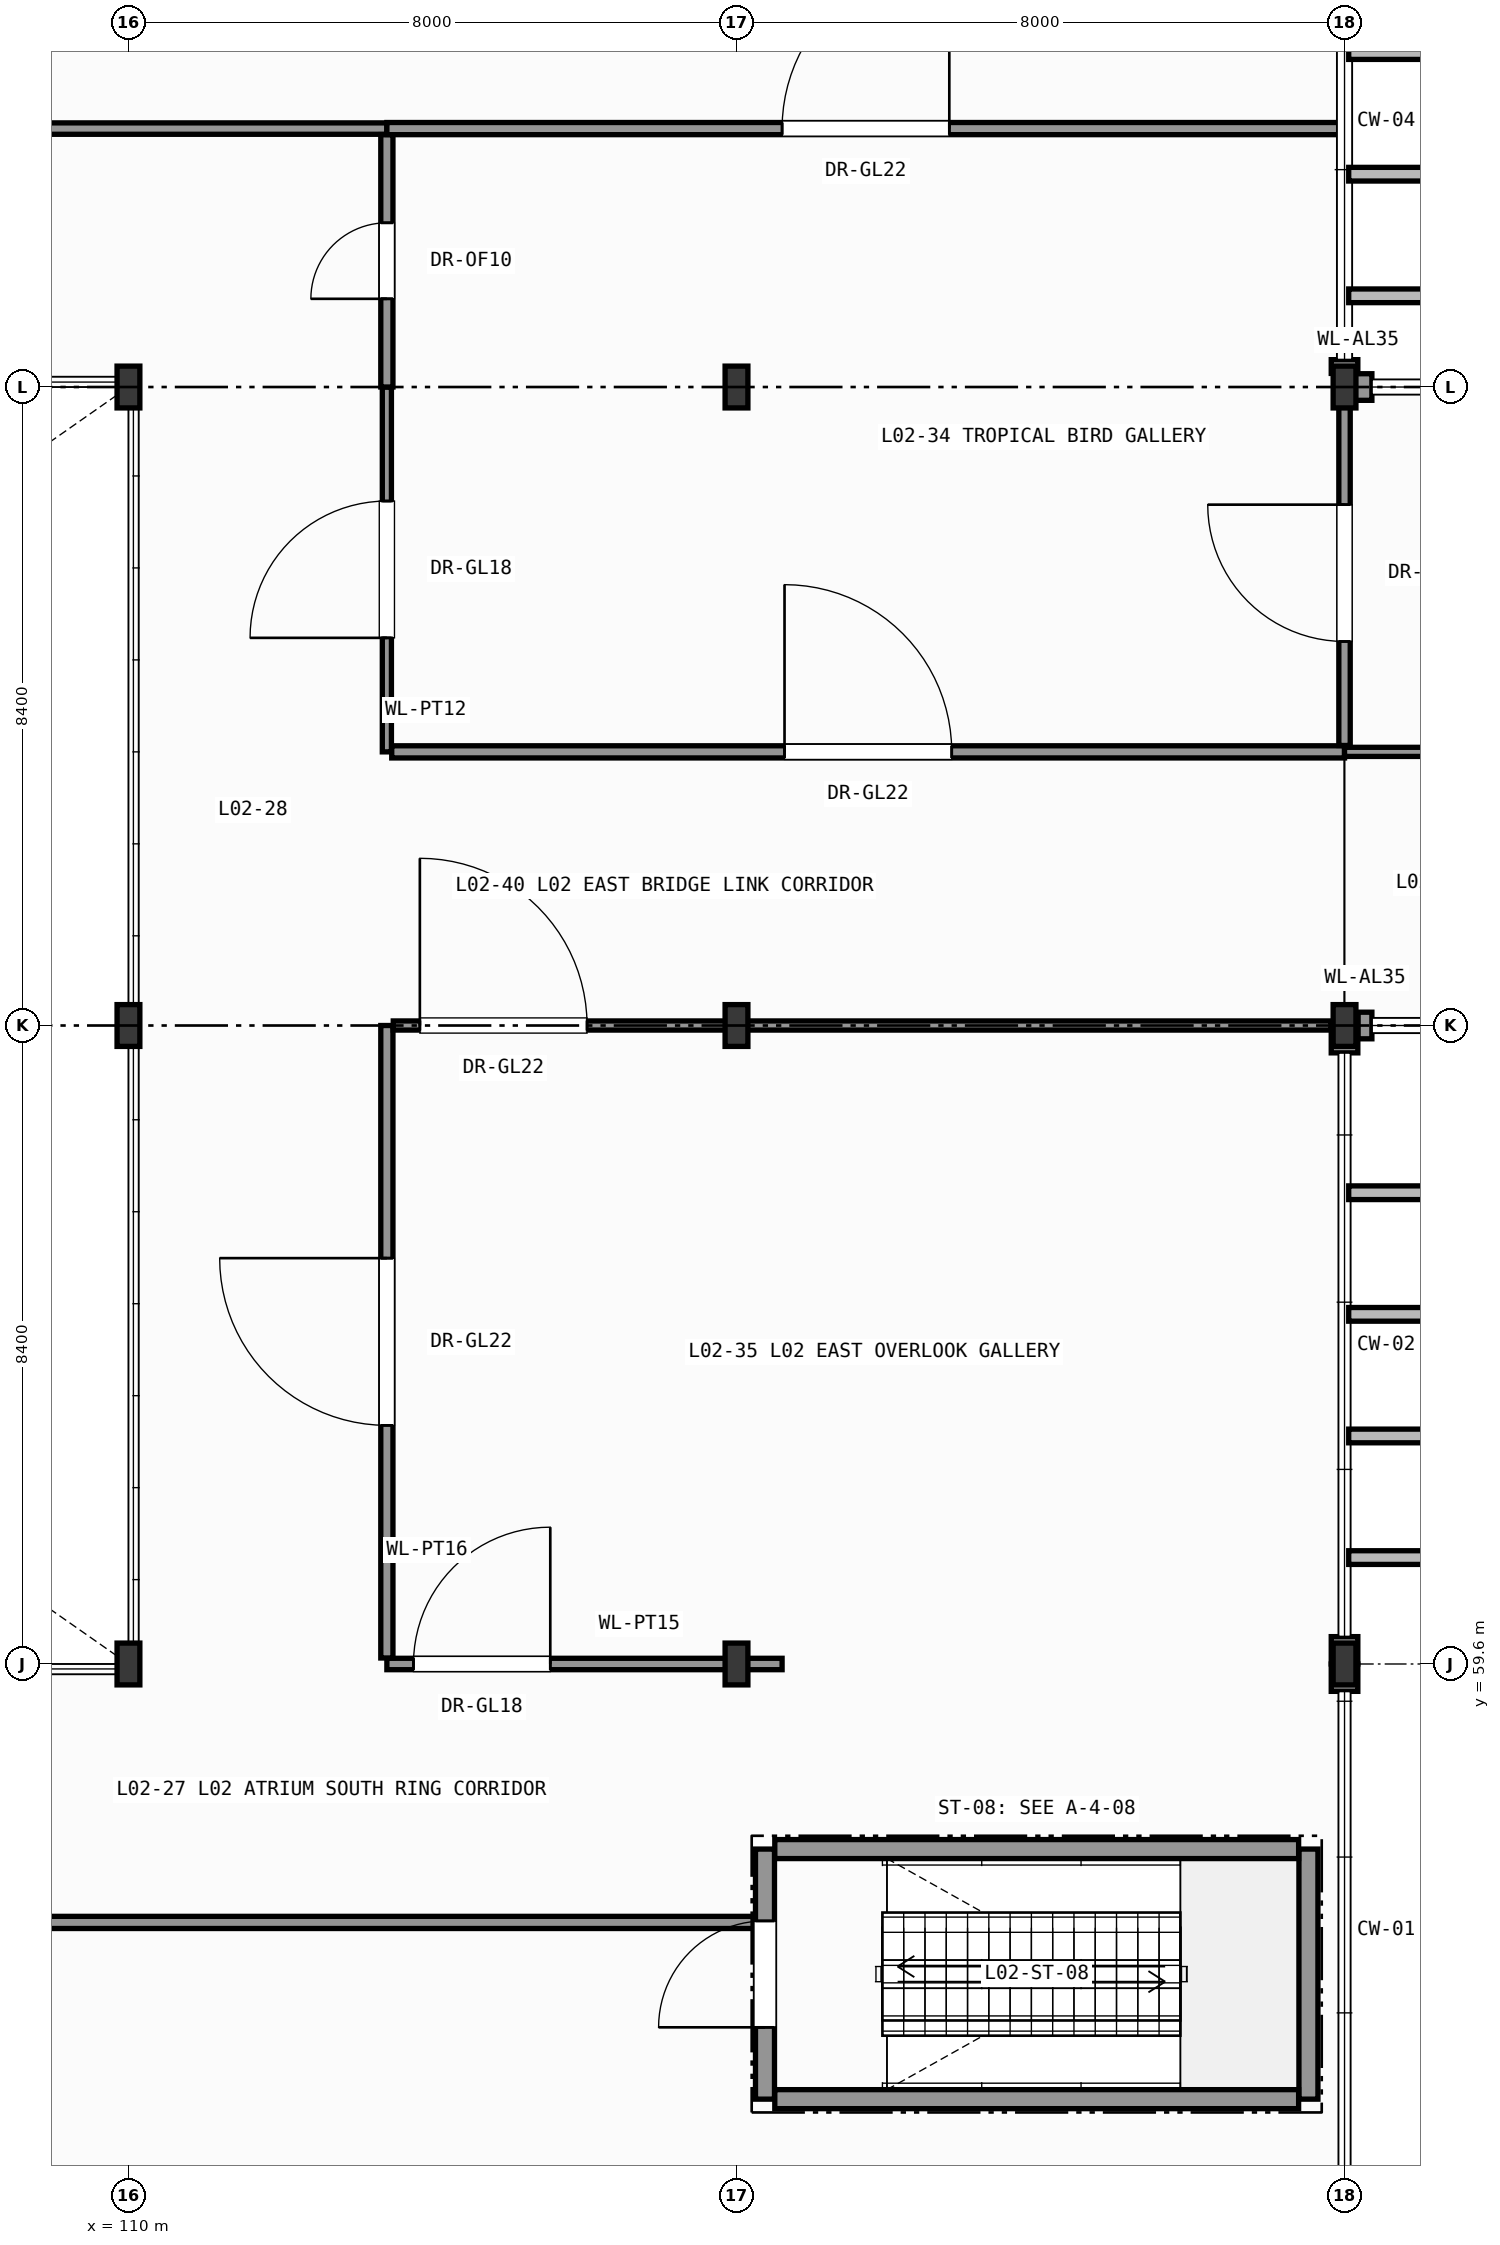
"""IFC4 building model, lengths in metres.
Left out: names, types, materials, properties, quantities, classifications, styles, units other than length and angle.
Written with IfcOpenShell. Run it as: python <this file> out.ifc"""

import sys

from ifc_helpers import new_model, si_unit, direction, frame, frame_2d, origin, origin_2d, place, context, subcontext, project, spatial, rectangle, i_section, extrude, element, fill, save


model = new_model("IFC4")
c1 = context("Model", 3, precision=1e-05, world=origin(), true_north=direction((0.0, 1.0)))
c2 = subcontext(c1, "Body", "Model", "MODEL_VIEW")
j1 = project(units=[si_unit("LENGTHUNIT", "METRE"), si_unit("PLANEANGLEUNIT", "RADIAN")], contexts=[c1])
p1 = place(None, origin())
s1 = spatial("IfcSite", under=j1, at=p1, CompositionType="ELEMENT")
p2 = place(p1, origin())
s2 = spatial("IfcBuilding", under=s1, at=p2, CompositionType="ELEMENT")
p3 = place(p2, frame((0.0, 0.0, 7.8)))
s3 = spatial("IfcBuildingStorey", under=s2, at=p3, CompositionType="ELEMENT", Elevation=7.8)
for number, where, z_axis, x_axis in (
    (1, (110.0, 59.6, 0.0), (0.0, 0.0, 1.0), (1.0, 0.0, 0.0)),
    (2, (110.0, 68.0, 0.0), (0.0, 0.0, 1.0), (1.0, 0.0, 0.0)),
    (3, (110.0, 76.4, 0.0), (0.0, 0.0, 1.0), (1.0, 0.0, 0.0)),
    (4, (118.0, 59.6, 0.0), (0.0, 0.0, 1.0), (1.0, 0.0, 0.0)),
    (5, (118.0, 68.0, 0.0), (0.0, 0.0, 1.0), (1.0, 0.0, 0.0)),
    (6, (118.0, 76.4, 0.0), (0.0, 0.0, 1.0), (1.0, 0.0, 0.0)),
    (7, (126.0, 59.6, 0.0), (0.0, 0.0, 1.0), (1.0, 0.0, 0.0)),
    (8, (126.0, 68.0, 0.0), (0.0, 0.0, 1.0), (1.0, 0.0, 0.0)),
    (9, (126.0, 76.4, 0.0), (0.0, 0.0, 1.0), (1.0, 0.0, 0.0)),
):
    element("IfcColumn", number, at=place(p3, frame(where, z_axis=z_axis, x_axis=x_axis)), inside=s3, PredefinedType="COLUMN", context=c2, shape_type="SweptSolid", body=[
        extrude(i_section(OverallWidth=0.3, OverallDepth=0.55, WebThickness=0.015, FlangeThickness=0.029, FilletRadius=0.027, at=origin_2d()), origin(), (0.0, 0.0, 1.0), 5.4),
    ])
p4 = place(p3, frame((126.0, 59.24, 0.0), z_axis=(0.0, 0.0, 1.0), x_axis=(0.0, 1.0, 0.0)))
e10 = element("IfcWall", 10, at=p4, inside=s3, PredefinedType="SOLIDWALL", context=c2, shape_type="SweptSolid", body=[
    extrude(rectangle(XDim=0.36, YDim=0.35, at=frame_2d((0.18, 0.0))), origin(), (0.0, 0.0, 1.0), 4.845),
])
p5 = place(p3, frame((126.0, 59.6, 0.0), z_axis=(0.0, 0.0, 1.0), x_axis=(0.0, 1.0, 0.0)))
e11 = element("IfcWall", 11, at=p5, inside=s3, PredefinedType="SOLIDWALL", context=c2, shape_type="SweptSolid", body=[
    extrude(rectangle(XDim=0.36, YDim=0.35, at=frame_2d((0.18, 0.0))), origin(), (0.0, 0.0, 1.0), 4.695),
])
p6 = place(p3, frame((126.0, 67.64, 0.0), z_axis=(0.0, 0.0, 1.0), x_axis=(0.0, 1.0, 0.0)))
e12 = element("IfcWall", 12, at=p6, inside=s3, PredefinedType="SOLIDWALL", context=c2, shape_type="SweptSolid", body=[
    extrude(rectangle(XDim=0.36, YDim=0.35, at=frame_2d((0.18, 0.0))), origin(), (0.0, 0.0, 1.0), 4.695),
])
p7 = place(p3, frame((126.179, 68.0, 0.0), z_axis=(0.0, 0.0, 1.0), x_axis=(1.0, 0.0, 0.0)))
e13 = element("IfcWall", 13, at=p7, inside=s3, PredefinedType="SOLIDWALL", context=c2, shape_type="SweptSolid", body=[
    extrude(rectangle(XDim=0.181, YDim=0.35, at=frame_2d((0.091, 0.0))), origin(), (0.0, 0.0, 1.0), 5.15),
])
p8 = place(p3, frame((126.36, 76.4, 0.0), z_axis=(0.0, 0.0, 1.0), x_axis=(-1.0, 0.0, 0.0)))
e14 = element("IfcWall", 14, at=p8, inside=s3, PredefinedType="SOLIDWALL", context=c2, shape_type="SweptSolid", body=[
    extrude(rectangle(XDim=0.36, YDim=0.35, at=frame_2d((0.18, 0.0))), origin(), (0.0, 0.0, 1.0), 4.745),
])
p9 = place(p3, frame((126.0, 76.579, 0.0), z_axis=(0.0, 0.0, 1.0), x_axis=(0.0, 1.0, 0.0)))
e15 = element("IfcWall", 15, at=p9, inside=s3, PredefinedType="SOLIDWALL", context=c2, shape_type="SweptSolid", body=[
    extrude(rectangle(XDim=0.181, YDim=0.35, at=frame_2d((0.09, 0.0))), origin(), (0.0, 0.0, 1.0), 5.15),
])
p10 = place(p3, frame((118.375, 53.875, 0.0), z_axis=(0.0, 0.0, 1.0), x_axis=(0.0, 1.0, 0.0)))
e16 = element("IfcWall", 16, at=p10, inside=s3, PredefinedType="SHEAR", context=c2, shape_type="SweptSolid", body=[
    extrude(rectangle(XDim=3.29, YDim=0.25, at=frame_2d((1.645, 0.0))), origin(), (0.0, 0.0, 1.0), 5.15),
])
p11 = place(p10, frame((0.945, 0.0, 0.0)))
e17 = element("IfcOpeningElement", 17, at=p11, cuts=e16, PredefinedType="OPENING", context=c2, shape_type="SweptSolid", body=[
    extrude(rectangle(XDim=1.4, YDim=2.2, at=frame_2d((0.7, 1.1))), frame((0.0, 0.135, 0.0), z_axis=(0.0, -1.0, 0.0), x_axis=(1.0, 0.0, 0.0)), (0.0, 0.0, 1.0), 0.27),
])
p12 = place(p3, frame((125.525, 53.875, 0.0), z_axis=(0.0, 0.0, 1.0), x_axis=(0.0, 1.0, 0.0)))
e18 = element("IfcWall", 18, at=p12, inside=s3, PredefinedType="SHEAR", context=c2, shape_type="SweptSolid", body=[
    extrude(rectangle(XDim=3.29, YDim=0.25, at=frame_2d((1.645, 0.0))), origin(), (0.0, 0.0, 1.0), 5.15),
])
for number, where, z_axis, x_axis in (
    (19, (118.504, 53.875, 0.0), (0.0, 0.0, 1.0), (1.0, 0.0, 0.0)),
    (20, (118.504, 57.165, 0.0), (0.0, 0.0, 1.0), (1.0, 0.0, 0.0)),
):
    element("IfcWall", number, at=place(p3, frame(where, z_axis=z_axis, x_axis=x_axis)), inside=s3, PredefinedType="SHEAR", context=c2, shape_type="SweptSolid", body=[
        extrude(rectangle(XDim=6.892, YDim=0.25, at=frame_2d((3.446, 0.0))), origin(), (0.0, 0.0, 1.0), 5.15),
    ])
p13 = place(p3, frame((82.6, 56.2, 0.0), z_axis=(0.0, 0.0, 1.0), x_axis=(1.0, 0.0, 0.0)))
e21 = element("IfcWall", 21, at=p13, inside=s3, PredefinedType="PARTITIONING", context=c2, shape_type="SweptSolid", body=[
    extrude(rectangle(XDim=35.646, YDim=0.16, at=frame_2d((17.823, 0.0))), origin(), (0.0, 0.0, 1.0), 4.775),
])
p14 = place(p13, frame((16.723, 0.0, 0.0)))
e22 = element("IfcOpeningElement", 22, at=p14, cuts=e21, PredefinedType="OPENING", context=c2, shape_type="SweptSolid", body=[
    extrude(rectangle(XDim=2.2, YDim=2.6, at=frame_2d((1.1, 1.3))), frame((0.0, 0.09, 0.0), z_axis=(0.0, -1.0, 0.0), x_axis=(1.0, 0.0, 0.0)), (0.0, 0.0, 1.0), 0.18),
])
p15 = place(p3, frame((113.4, 59.6, 0.0), z_axis=(0.0, 0.0, 1.0), x_axis=(1.0, 0.0, 0.0)))
e23 = element("IfcWall", 23, at=p15, inside=s3, PredefinedType="PARTITIONING", context=c2, shape_type="SweptSolid", body=[
    extrude(rectangle(XDim=5.2, YDim=0.15, at=frame_2d((2.6, 0.0))), origin(), (0.0, 0.0, 1.0), 4.745),
])
p16 = place(p15, frame((0.35, 0.0, 0.0)))
e24 = element("IfcOpeningElement", 24, at=p16, cuts=e23, PredefinedType="OPENING", context=c2, shape_type="SweptSolid", body=[
    extrude(rectangle(XDim=1.8, YDim=2.4, at=frame_2d((0.9, 1.2))), frame((0.0, 0.085, 0.0), z_axis=(0.0, -1.0, 0.0), x_axis=(1.0, 0.0, 0.0)), (0.0, 0.0, 1.0), 0.17),
])
p17 = place(p3, frame((113.4, 71.6, 0.0), z_axis=(0.0, 0.0, 1.0), x_axis=(0.0, 1.0, 0.0)))
e25 = element("IfcWall", 25, at=p17, inside=s3, PredefinedType="PARTITIONING", context=c2, shape_type="SweptSolid", body=[
    extrude(rectangle(XDim=4.8, YDim=0.12, at=frame_2d((2.4, 0.0))), origin(), (0.0, 0.0, 1.0), 5.15),
])
p18 = place(p17, frame((1.5, 0.0, 0.0)))
e26 = element("IfcOpeningElement", 26, at=p18, cuts=e25, PredefinedType="OPENING", context=c2, shape_type="SweptSolid", body=[
    extrude(rectangle(XDim=1.8, YDim=2.4, at=frame_2d((0.9, 1.2))), frame((0.0, 0.07, 0.0), z_axis=(0.0, -1.0, 0.0), x_axis=(1.0, 0.0, 0.0)), (0.0, 0.0, 1.0), 0.14),
])
p19 = place(p3, frame((113.4, 59.679, 0.0), z_axis=(0.0, 0.0, 1.0), x_axis=(0.0, 1.0, 0.0)))
e27 = element("IfcWall", 27, at=p19, inside=s3, PredefinedType="PARTITIONING", context=c2, shape_type="SweptSolid", body=[
    extrude(rectangle(XDim=8.321, YDim=0.16, at=frame_2d((4.161, 0.0))), origin(), (0.0, 0.0, 1.0), 5.15),
])
p20 = place(p19, frame((3.061, 0.0, 0.0)))
e28 = element("IfcOpeningElement", 28, at=p20, cuts=e27, PredefinedType="OPENING", context=c2, shape_type="SweptSolid", body=[
    extrude(rectangle(XDim=2.2, YDim=2.6, at=frame_2d((1.1, 1.3))), frame((0.0, 0.09, 0.0), z_axis=(0.0, -1.0, 0.0), x_axis=(1.0, 0.0, 0.0)), (0.0, 0.0, 1.0), 0.18),
])
p21 = place(p3, frame((97.4, 79.8, 0.0), z_axis=(0.0, 0.0, 1.0), x_axis=(1.0, 0.0, 0.0)))
e29 = element("IfcWall", 29, at=p21, inside=s3, PredefinedType="PARTITIONING", context=c2, shape_type="SweptSolid", body=[
    extrude(rectangle(XDim=16.0, YDim=0.15, at=frame_2d((8.0, 0.0))), origin(), (0.0, 0.0, 1.0), 4.775),
])
p22 = place(p21, frame((6.9, 0.0, 0.0)))
e30 = element("IfcOpeningElement", 30, at=p22, cuts=e29, PredefinedType="OPENING", context=c2, shape_type="SweptSolid", body=[
    extrude(rectangle(XDim=2.2, YDim=2.6, at=frame_2d((1.1, 1.3))), frame((0.0, 0.085, 0.0), z_axis=(0.0, -1.0, 0.0), x_axis=(1.0, 0.0, 0.0)), (0.0, 0.0, 1.0), 0.17),
])
p23 = place(p3, frame((113.4, 76.4, 0.0), z_axis=(0.0, 0.0, 1.0), x_axis=(0.0, 1.0, 0.0)))
e31 = element("IfcWall", 31, at=p23, inside=s3, PredefinedType="PARTITIONING", context=c2, shape_type="SweptSolid", body=[
    extrude(rectangle(XDim=3.321, YDim=0.16, at=frame_2d((1.661, 0.0))), origin(), (0.0, 0.0, 1.0), 5.15),
])
p24 = place(p23, frame((1.16, 0.0, 0.0)))
e32 = element("IfcOpeningElement", 32, at=p24, cuts=e31, PredefinedType="OPENING", context=c2, shape_type="SweptSolid", body=[
    extrude(rectangle(XDim=1.0, YDim=2.15, at=frame_2d((0.5, 1.075))), frame((0.0, 0.09, 0.0), z_axis=(0.0, -1.0, 0.0), x_axis=(1.0, 0.0, 0.0)), (0.0, 0.0, 1.0), 0.18),
])
p25 = place(p3, frame((113.4, 79.8, 0.0), z_axis=(0.0, 0.0, 1.0), x_axis=(1.0, 0.0, 0.0)))
e33 = element("IfcWall", 33, at=p25, inside=s3, PredefinedType="PARTITIONING", context=c2, shape_type="SweptSolid", body=[
    extrude(rectangle(XDim=12.6, YDim=0.16, at=frame_2d((6.3, 0.0))), origin(), (0.0, 0.0, 1.0), 4.775),
])
p26 = place(p25, frame((5.2, 0.0, 0.0)))
e34 = element("IfcOpeningElement", 34, at=p26, cuts=e33, PredefinedType="OPENING", context=c2, shape_type="SweptSolid", body=[
    extrude(rectangle(XDim=2.2, YDim=2.6, at=frame_2d((1.1, 1.3))), frame((0.0, 0.09, 0.0), z_axis=(0.0, -1.0, 0.0), x_axis=(1.0, 0.0, 0.0)), (0.0, 0.0, 1.0), 0.18),
])
p27 = place(p3, frame((113.464, 71.6, 0.0), z_axis=(0.0, 0.0, 1.0), x_axis=(1.0, 0.0, 0.0)))
e35 = element("IfcWall", 35, at=p27, inside=s3, PredefinedType="PARTITIONING", context=c2, shape_type="SweptSolid", body=[
    extrude(rectangle(XDim=12.536, YDim=0.16, at=frame_2d((6.268, 0.0))), origin(), (0.0, 0.0, 1.0), 5.15),
])
p28 = place(p27, frame((5.168, 0.0, 0.0)))
e36 = element("IfcOpeningElement", 36, at=p28, cuts=e35, PredefinedType="OPENING", context=c2, shape_type="SweptSolid", body=[
    extrude(rectangle(XDim=2.2, YDim=2.6, at=frame_2d((1.1, 1.3))), frame((0.0, 0.09, 0.0), z_axis=(0.0, -1.0, 0.0), x_axis=(1.0, 0.0, 0.0)), (0.0, 0.0, 1.0), 0.18),
])
p29 = place(p3, frame((126.0, 71.684, 0.0), z_axis=(0.0, 0.0, 1.0), x_axis=(0.0, 1.0, 0.0)))
e37 = element("IfcWall", 37, at=p29, inside=s3, PredefinedType="PARTITIONING", context=c2, shape_type="SweptSolid", body=[
    extrude(rectangle(XDim=4.537, YDim=0.15, at=frame_2d((2.269, 0.0))), origin(), (0.0, 0.0, 1.0), 4.695),
])
p30 = place(p29, frame((1.368, 0.0, 0.0)))
e38 = element("IfcOpeningElement", 38, at=p30, cuts=e37, PredefinedType="OPENING", context=c2, shape_type="SweptSolid", body=[
    extrude(rectangle(XDim=1.8, YDim=2.4, at=frame_2d((0.9, 1.2))), frame((0.0, 0.085, 0.0), z_axis=(0.0, -1.0, 0.0), x_axis=(1.0, 0.0, 0.0)), (0.0, 0.0, 1.0), 0.17),
])
p31 = place(p3, frame((113.484, 68.0, 0.0), z_axis=(0.0, 0.0, 1.0), x_axis=(1.0, 0.0, 0.0)))
e39 = element("IfcWall", 39, at=p31, inside=s3, PredefinedType="PARTITIONING", context=c2, shape_type="SweptSolid", body=[
    extrude(rectangle(XDim=12.337, YDim=0.12, at=frame_2d((6.168, 0.0))), origin(), (0.0, 0.0, 1.0), 4.635),
])
p32 = place(p31, frame((0.35, 0.0, 0.0)))
e40 = element("IfcOpeningElement", 40, at=p32, cuts=e39, PredefinedType="OPENING", context=c2, shape_type="SweptSolid", body=[
    extrude(rectangle(XDim=2.2, YDim=2.6, at=frame_2d((1.1, 1.3))), frame((0.0, 0.07, 0.0), z_axis=(0.0, -1.0, 0.0), x_axis=(1.0, 0.0, 0.0)), (0.0, 0.0, 1.0), 0.14),
])
p33 = place(p3, frame((126.0, 71.6, 0.0), z_axis=(0.0, 0.0, 1.0), x_axis=(1.0, 0.0, 0.0)))
e41 = element("IfcWall", 41, at=p33, inside=s3, PredefinedType="PARTITIONING", context=c2, shape_type="SweptSolid", body=[
    extrude(rectangle(XDim=41.0, YDim=0.12, at=frame_2d((20.5, 0.0))), origin(), (0.0, 0.0, 1.0), 5.15),
])
p34 = place(p33, frame((19.4, 0.0, 0.0)))
e42 = element("IfcOpeningElement", 42, at=p34, cuts=e41, PredefinedType="OPENING", context=c2, shape_type="SweptSolid", body=[
    extrude(rectangle(XDim=2.2, YDim=2.6, at=frame_2d((1.1, 1.3))), frame((0.0, 0.07, 0.0), z_axis=(0.0, -1.0, 0.0), x_axis=(1.0, 0.0, 0.0)), (0.0, 0.0, 1.0), 0.14),
])
p35 = place(p11, origin())
e43 = element("IfcDoor", 43, at=p35, inside=s3, OperationType="SINGLE_SWING_LEFT", PredefinedType="DOOR", context=c2, shape_type="SweptSolid", body=[
    extrude(rectangle(XDim=1.4, YDim=2.2, at=frame_2d((0.7, 1.1))), frame((0.0, 0.025, 0.0), z_axis=(0.0, -1.0, 0.0), x_axis=(1.0, 0.0, 0.0)), (0.0, 0.0, 1.0), 0.05),
])
fill(e17, e43)
p36 = place(p16, origin())
e44 = element("IfcDoor", 44, at=p36, inside=s3, OperationType="SINGLE_SWING_RIGHT", PredefinedType="DOOR", context=c2, shape_type="SweptSolid", body=[
    extrude(rectangle(XDim=1.8, YDim=2.4, at=frame_2d((0.9, 1.2))), frame((0.0, 0.025, 0.0), z_axis=(0.0, -1.0, 0.0), x_axis=(1.0, 0.0, 0.0)), (0.0, 0.0, 1.0), 0.05),
])
fill(e24, e44)
p37 = place(p18, origin())
e45 = element("IfcDoor", 45, at=p37, inside=s3, OperationType="SINGLE_SWING_LEFT", PredefinedType="DOOR", context=c2, shape_type="SweptSolid", body=[
    extrude(rectangle(XDim=1.8, YDim=2.4, at=frame_2d((0.9, 1.2))), frame((0.0, 0.025, 0.0), z_axis=(0.0, -1.0, 0.0), x_axis=(1.0, 0.0, 0.0)), (0.0, 0.0, 1.0), 0.05),
])
fill(e26, e45)
p38 = place(p20, origin())
e46 = element("IfcDoor", 46, at=p38, inside=s3, OperationType="SINGLE_SWING_RIGHT", PredefinedType="DOOR", context=c2, shape_type="SweptSolid", body=[
    extrude(rectangle(XDim=2.2, YDim=2.6, at=frame_2d((1.1, 1.3))), frame((0.0, 0.025, 0.0), z_axis=(0.0, -1.0, 0.0), x_axis=(1.0, 0.0, 0.0)), (0.0, 0.0, 1.0), 0.05),
])
fill(e28, e46)
p39 = place(p24, origin())
e47 = element("IfcDoor", 47, at=p39, inside=s3, OperationType="SINGLE_SWING_LEFT", PredefinedType="DOOR", context=c2, shape_type="SweptSolid", body=[
    extrude(rectangle(XDim=1.0, YDim=2.15, at=frame_2d((0.5, 1.075))), frame((0.0, 0.025, 0.0), z_axis=(0.0, -1.0, 0.0), x_axis=(1.0, 0.0, 0.0)), (0.0, 0.0, 1.0), 0.05),
])
fill(e32, e47)
p40 = place(p26, origin())
e48 = element("IfcDoor", 48, at=p40, inside=s3, OperationType="SINGLE_SWING_RIGHT", PredefinedType="DOOR", context=c2, shape_type="SweptSolid", body=[
    extrude(rectangle(XDim=2.2, YDim=2.6, at=frame_2d((1.1, 1.3))), frame((0.0, 0.025, 0.0), z_axis=(0.0, -1.0, 0.0), x_axis=(1.0, 0.0, 0.0)), (0.0, 0.0, 1.0), 0.05),
])
fill(e34, e48)
p41 = place(p28, origin())
e49 = element("IfcDoor", 49, at=p41, inside=s3, OperationType="SINGLE_SWING_LEFT", PredefinedType="DOOR", context=c2, shape_type="SweptSolid", body=[
    extrude(rectangle(XDim=2.2, YDim=2.6, at=frame_2d((1.1, 1.3))), frame((0.0, 0.025, 0.0), z_axis=(0.0, -1.0, 0.0), x_axis=(1.0, 0.0, 0.0)), (0.0, 0.0, 1.0), 0.05),
])
fill(e36, e49)
p42 = place(p30, origin())
e50 = element("IfcDoor", 50, at=p42, inside=s3, OperationType="SINGLE_SWING_RIGHT", PredefinedType="DOOR", context=c2, shape_type="SweptSolid", body=[
    extrude(rectangle(XDim=1.8, YDim=2.4, at=frame_2d((0.9, 1.2))), frame((0.0, 0.025, 0.0), z_axis=(0.0, -1.0, 0.0), x_axis=(1.0, 0.0, 0.0)), (0.0, 0.0, 1.0), 0.05),
])
fill(e38, e50)
p43 = place(p32, origin())
e51 = element("IfcDoor", 51, at=p43, inside=s3, OperationType="SINGLE_SWING_LEFT", PredefinedType="DOOR", context=c2, shape_type="SweptSolid", body=[
    extrude(rectangle(XDim=2.2, YDim=2.6, at=frame_2d((1.1, 1.3))), frame((0.0, 0.025, 0.0), z_axis=(0.0, -1.0, 0.0), x_axis=(1.0, 0.0, 0.0)), (0.0, 0.0, 1.0), 0.05),
])
fill(e40, e51)
save(model, sys.argv[1])
